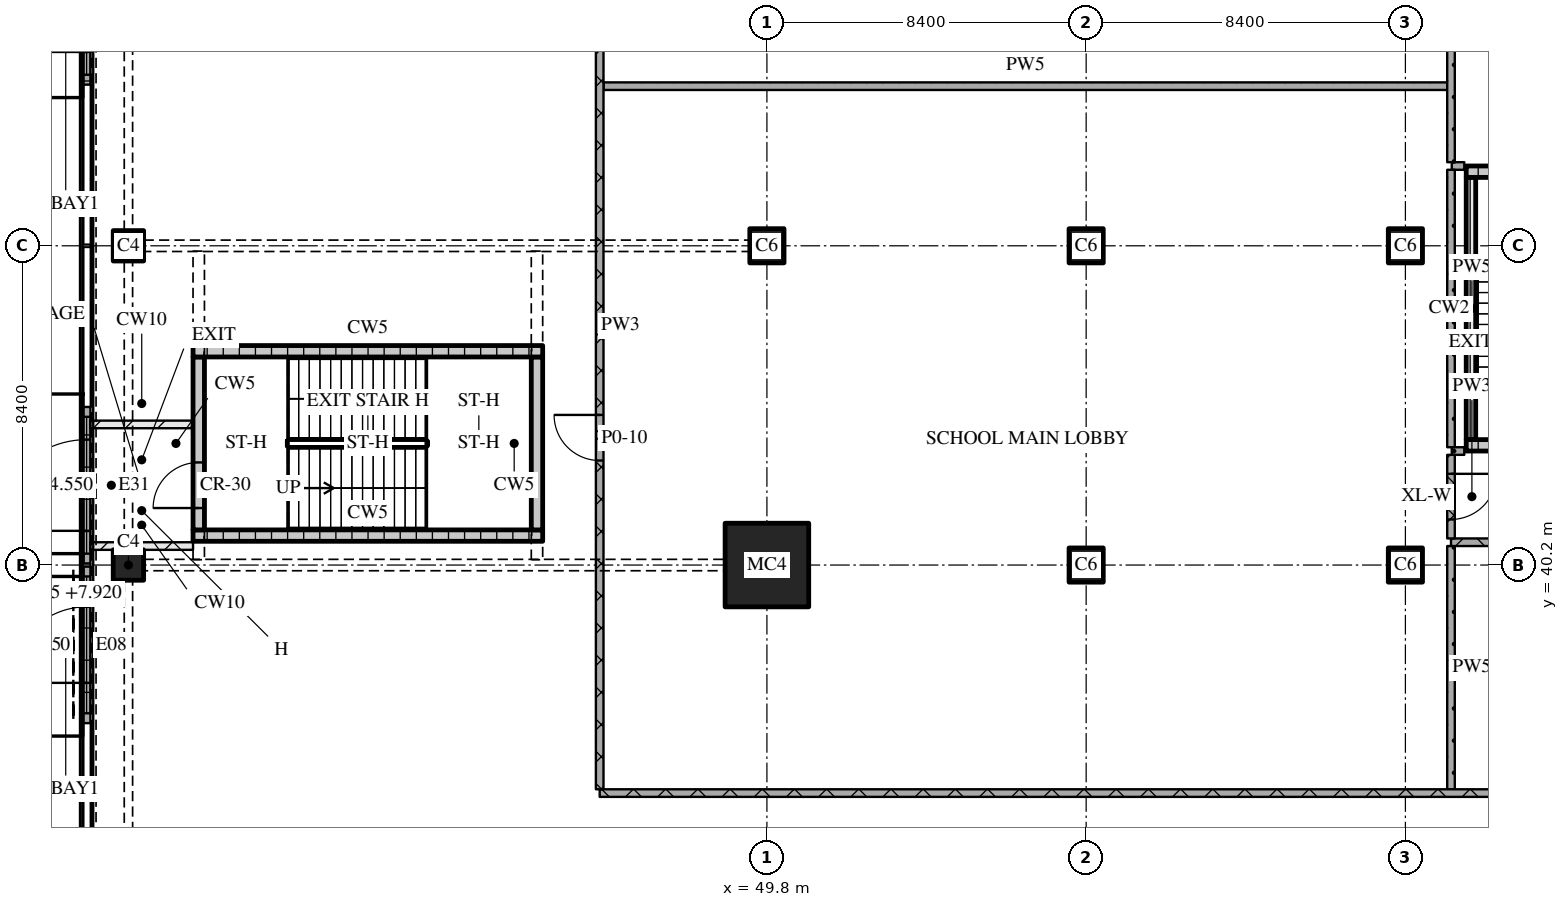
"""IFC4 building model, lengths in metres.
Left out: names, types, materials, properties, quantities, classifications, styles, units other than length and angle.
Written with IfcOpenShell. Run it as: python <this file> out.ifc"""

import sys

from ifc_helpers import new_model, si_unit, direction, frame, frame_2d, origin, origin_2d, place, context, subcontext, project, spatial, rectangle, extrude, element, fill, save


model = new_model("IFC4")
c1 = context("Model", 3, precision=1e-05, world=origin(), true_north=direction((0.0, 1.0)))
c2 = subcontext(c1, "Body", "Model", "MODEL_VIEW")
j1 = project(units=[si_unit("LENGTHUNIT", "METRE"), si_unit("PLANEANGLEUNIT", "RADIAN")], contexts=[c1])
p1 = place(None, origin())
s1 = spatial("IfcSite", under=j1, at=p1, CompositionType="ELEMENT")
p2 = place(p1, origin())
s2 = spatial("IfcBuilding", under=s1, at=p2, CompositionType="ELEMENT")
p3 = place(p2, origin())
s3 = spatial("IfcBuildingStorey", under=s2, at=p3, CompositionType="ELEMENT", Elevation=0.0)
p4 = place(p3, frame((49.8, 40.2, 0.0), z_axis=(0.0, 0.0, 1.0), x_axis=(1.0, 0.0, 0.0)))
e1 = element("IfcColumn", 1, at=p4, inside=s3, PredefinedType="COLUMN", context=c2, shape_type="SweptSolid", body=[
    extrude(rectangle(XDim=2.2, YDim=2.2, at=origin_2d()), origin(), (0.0, 0.0, 1.0), 9.0),
])
for number, where, z_axis, x_axis in (
    (2, (49.8, 48.6, 0.0), (0.0, 0.0, 1.0), (1.0, 0.0, 0.0)),
    (3, (58.2, 40.2, 0.0), (0.0, 0.0, 1.0), (1.0, 0.0, 0.0)),
    (4, (58.2, 48.6, 0.0), (0.0, 0.0, 1.0), (1.0, 0.0, 0.0)),
    (5, (66.6, 40.2, 0.0), (0.0, 0.0, 1.0), (1.0, 0.0, 0.0)),
    (6, (66.6, 48.6, 0.0), (0.0, 0.0, 1.0), (1.0, 0.0, 0.0)),
):
    element("IfcColumn", number, at=place(p3, frame(where, z_axis=z_axis, x_axis=x_axis)), inside=s3, PredefinedType="COLUMN", context=c2, shape_type="SweptSolid", body=[
        extrude(rectangle(XDim=0.9, YDim=0.9, at=origin_2d()), origin(), (0.0, 0.0, 1.0), 9.0),
    ])
for number, where, z_axis, x_axis in (
    (7, (33.0, 40.2, 0.0), (0.0, 0.0, 1.0), (1.0, 0.0, 0.0)),
    (8, (33.0, 48.6, 0.0), (0.0, 0.0, 1.0), (1.0, 0.0, 0.0)),
):
    element("IfcColumn", number, at=place(p3, frame(where, z_axis=z_axis, x_axis=x_axis)), inside=s3, PredefinedType="COLUMN", context=c2, shape_type="SweptSolid", body=[
        extrude(rectangle(XDim=0.8, YDim=0.8, at=origin_2d()), origin(), (0.0, 0.0, 1.0), 9.0),
    ])
p5 = place(p3, frame((31.9, 36.04, 0.0), z_axis=(0.0, 0.0, 1.0), x_axis=(0.0, 1.0, 0.0)))
e9 = element("IfcWall", 9, at=p5, inside=s3, PredefinedType="SOLIDWALL", context=c2, shape_type="SweptSolid", body=[
    extrude(rectangle(XDim=4.12, YDim=0.2, at=frame_2d((2.06, 0.0))), origin(), (0.0, 0.0, 1.0), 8.7),
])
p6 = place(p5, frame((1.06, 0.0, 0.0)))
e10 = element("IfcOpeningElement", 10, at=p6, cuts=e9, PredefinedType="OPENING", context=c2, shape_type="SweptSolid", body=[
    extrude(rectangle(XDim=2.0, YDim=2.4, at=frame_2d((1.0, 1.2))), frame((0.0, 0.11, 0.0), z_axis=(0.0, -1.0, 0.0), x_axis=(1.0, 0.0, 0.0)), (0.0, 0.0, 1.0), 0.22),
])
p7 = place(p5, frame((0.26, 0.0, 2.7)))
e11 = element("IfcOpeningElement", 11, at=p7, cuts=e9, PredefinedType="OPENING", context=c2, shape_type="SweptSolid", body=[
    extrude(rectangle(XDim=3.6, YDim=5.6, at=frame_2d((1.8, 2.8))), frame((0.0, 0.11, 0.0), z_axis=(0.0, -1.0, 0.0), x_axis=(1.0, 0.0, 0.0)), (0.0, 0.0, 1.0), 0.22),
])
p8 = place(p3, frame((31.9, 52.84, 0.0), z_axis=(0.0, 0.0, 1.0), x_axis=(0.0, 1.0, 0.0)))
e12 = element("IfcWall", 12, at=p8, inside=s3, PredefinedType="SOLIDWALL", context=c2, shape_type="SweptSolid", body=[
    extrude(rectangle(XDim=4.12, YDim=0.2, at=frame_2d((2.06, 0.0))), origin(), (0.0, 0.0, 1.0), 8.7),
])
p9 = place(p8, frame((0.86, 0.0, 0.0)))
e13 = element("IfcOpeningElement", 13, at=p9, cuts=e12, PredefinedType="OPENING", context=c2, shape_type="SweptSolid", body=[
    extrude(rectangle(XDim=2.4, YDim=2.4, at=frame_2d((1.2, 1.2))), frame((0.0, 0.11, 0.0), z_axis=(0.0, -1.0, 0.0), x_axis=(1.0, 0.0, 0.0)), (0.0, 0.0, 1.0), 0.22),
])
p10 = place(p8, frame((0.26, 0.0, 2.7)))
e14 = element("IfcOpeningElement", 14, at=p10, cuts=e12, PredefinedType="OPENING", context=c2, shape_type="SweptSolid", body=[
    extrude(rectangle(XDim=3.6, YDim=5.6, at=frame_2d((1.8, 2.8))), frame((0.0, 0.11, 0.0), z_axis=(0.0, -1.0, 0.0), x_axis=(1.0, 0.0, 0.0)), (0.0, 0.0, 1.0), 0.22),
])
p11 = place(p3, frame((31.9, 40.24, 0.0), z_axis=(0.0, 0.0, 1.0), x_axis=(0.0, 1.0, 0.0)))
e15 = element("IfcWall", 15, at=p11, inside=s3, PredefinedType="SOLIDWALL", context=c2, shape_type="SweptSolid", body=[
    extrude(rectangle(XDim=4.12, YDim=0.2, at=frame_2d((2.06, 0.0))), origin(), (0.0, 0.0, 1.0), 8.7),
])
p12 = place(p11, frame((0.86, 0.0, 0.0)))
e16 = element("IfcOpeningElement", 16, at=p12, cuts=e15, PredefinedType="OPENING", context=c2, shape_type="SweptSolid", body=[
    extrude(rectangle(XDim=2.4, YDim=2.4, at=frame_2d((1.2, 1.2))), frame((0.0, 0.11, 0.0), z_axis=(0.0, -1.0, 0.0), x_axis=(1.0, 0.0, 0.0)), (0.0, 0.0, 1.0), 0.22),
])
p13 = place(p11, frame((0.26, 0.0, 2.7)))
e17 = element("IfcOpeningElement", 17, at=p13, cuts=e15, PredefinedType="OPENING", context=c2, shape_type="SweptSolid", body=[
    extrude(rectangle(XDim=3.6, YDim=5.6, at=frame_2d((1.8, 2.8))), frame((0.0, 0.11, 0.0), z_axis=(0.0, -1.0, 0.0), x_axis=(1.0, 0.0, 0.0)), (0.0, 0.0, 1.0), 0.22),
])
p14 = place(p3, frame((68.2, 43.35, 0.0), z_axis=(0.0, 0.0, 1.0), x_axis=(1.0, 0.0, 0.0)))
e18 = element("IfcWall", 18, at=p14, inside=s3, PredefinedType="SOLIDWALL", context=c2, shape_type="SweptSolid", body=[
    extrude(rectangle(XDim=5.6, YDim=0.3, at=frame_2d((2.8, 0.0))), origin(), (0.0, 0.0, 1.0), 8.7),
])
p15 = place(p14, frame((3.875, 0.0, 0.0)))
e19 = element("IfcOpeningElement", 19, at=p15, cuts=e18, PredefinedType="OPENING", context=c2, shape_type="SweptSolid", body=[
    extrude(rectangle(XDim=1.0, YDim=2.1, at=frame_2d((0.5, 1.05))), frame((0.0, 0.16, 0.0), z_axis=(0.0, -1.0, 0.0), x_axis=(1.0, 0.0, 0.0)), (0.0, 0.0, 1.0), 0.32),
])
p16 = place(p3, frame((68.325, 43.5, 0.0), z_axis=(0.0, 0.0, 1.0), x_axis=(0.0, 1.0, 0.0)))
e20 = element("IfcWall", 20, at=p16, inside=s3, PredefinedType="SOLIDWALL", context=c2, shape_type="SweptSolid", body=[
    extrude(rectangle(XDim=6.9, YDim=0.25, at=frame_2d((3.45, 0.0))), origin(), (0.0, 0.0, 1.0), 8.7),
])
p17 = place(p3, frame((68.2, 50.55, 0.0), z_axis=(0.0, 0.0, 1.0), x_axis=(1.0, 0.0, 0.0)))
e21 = element("IfcWall", 21, at=p17, inside=s3, PredefinedType="SOLIDWALL", context=c2, shape_type="SweptSolid", body=[
    extrude(rectangle(XDim=5.6, YDim=0.3, at=frame_2d((2.8, 0.0))), origin(), (0.0, 0.0, 1.0), 8.7),
])
p18 = place(p3, frame((34.7, 40.975, 0.0), z_axis=(0.0, 0.0, 1.0), x_axis=(1.0, 0.0, 0.0)))
e22 = element("IfcWall", 22, at=p18, inside=s3, PredefinedType="SOLIDWALL", context=c2, shape_type="SweptSolid", body=[
    extrude(rectangle(XDim=9.2, YDim=0.3, at=frame_2d((4.6, 0.0))), origin(), (0.0, 0.0, 1.0), 8.7),
])
p19 = place(p3, frame((34.85, 41.125, 0.0), z_axis=(0.0, 0.0, 1.0), x_axis=(0.0, 1.0, 0.0)))
e23 = element("IfcWall", 23, at=p19, inside=s3, PredefinedType="SOLIDWALL", context=c2, shape_type="SweptSolid", body=[
    extrude(rectangle(XDim=4.55, YDim=0.3, at=frame_2d((2.275, 0.0))), origin(), (0.0, 0.0, 1.0), 8.7),
])
p20 = place(p19, frame((0.575, 0.0, 0.0)))
e24 = element("IfcOpeningElement", 24, at=p20, cuts=e23, PredefinedType="OPENING", context=c2, shape_type="SweptSolid", body=[
    extrude(rectangle(XDim=1.2, YDim=2.1, at=frame_2d((0.6, 1.05))), frame((0.0, 0.16, 0.0), z_axis=(0.0, -1.0, 0.0), x_axis=(1.0, 0.0, 0.0)), (0.0, 0.0, 1.0), 0.32),
])
p21 = place(p3, frame((43.75, 41.125, 0.0), z_axis=(0.0, 0.0, 1.0), x_axis=(0.0, 1.0, 0.0)))
e25 = element("IfcWall", 25, at=p21, inside=s3, PredefinedType="SOLIDWALL", context=c2, shape_type="SweptSolid", body=[
    extrude(rectangle(XDim=4.55, YDim=0.3, at=frame_2d((2.275, 0.0))), origin(), (0.0, 0.0, 1.0), 8.7),
])
p22 = place(p3, frame((34.7, 45.825, 0.0), z_axis=(0.0, 0.0, 1.0), x_axis=(1.0, 0.0, 0.0)))
e26 = element("IfcWall", 26, at=p22, inside=s3, PredefinedType="SOLIDWALL", context=c2, shape_type="SweptSolid", body=[
    extrude(rectangle(XDim=9.2, YDim=0.3, at=frame_2d((4.6, 0.0))), origin(), (0.0, 0.0, 1.0), 8.7),
])
for number, where, z_axis, x_axis in (
    (27, (32.0, 40.7, 0.0), (0.0, 0.0, 1.0), (1.0, 0.0, 0.0)),
    (28, (32.0, 43.9, 0.0), (0.0, 0.0, 1.0), (1.0, 0.0, 0.0)),
):
    element("IfcWall", number, at=place(p3, frame(where, z_axis=z_axis, x_axis=x_axis)), inside=s3, PredefinedType="PARTITIONING", context=c2, shape_type="SweptSolid", body=[
        extrude(rectangle(XDim=2.7, YDim=0.2, at=frame_2d((1.35, 0.0))), origin(), (0.0, 0.0, 1.0), 8.7),
    ])
p23 = place(p3, frame((45.4, 34.2, 0.0), z_axis=(0.0, 0.0, 1.0), x_axis=(1.0, 0.0, 0.0)))
e29 = element("IfcWall", 29, at=p23, inside=s3, PredefinedType="PARTITIONING", context=c2, shape_type="SweptSolid", body=[
    extrude(rectangle(XDim=84.4, YDim=0.2, at=frame_2d((42.2, 0.0))), origin(), (0.0, 0.0, 1.0), 8.7),
])
p24 = place(p23, frame((27.5, 0.0, 0.0)))
e30 = element("IfcOpeningElement", 30, at=p24, cuts=e29, PredefinedType="OPENING", context=c2, shape_type="SweptSolid", body=[
    extrude(rectangle(XDim=1.2, YDim=2.1, at=frame_2d((0.6, 1.05))), frame((0.0, 0.11, 0.0), z_axis=(0.0, -1.0, 0.0), x_axis=(1.0, 0.0, 0.0)), (0.0, 0.0, 1.0), 0.22),
])
p25 = place(p23, frame((41.5, 0.0, 0.0)))
e31 = element("IfcOpeningElement", 31, at=p25, cuts=e29, PredefinedType="OPENING", context=c2, shape_type="SweptSolid", body=[
    extrude(rectangle(XDim=1.2, YDim=2.1, at=frame_2d((0.6, 1.05))), frame((0.0, 0.11, 0.0), z_axis=(0.0, -1.0, 0.0), x_axis=(1.0, 0.0, 0.0)), (0.0, 0.0, 1.0), 0.22),
])
p26 = place(p23, frame((55.6, 0.0, 0.0)))
e32 = element("IfcOpeningElement", 32, at=p26, cuts=e29, PredefinedType="OPENING", context=c2, shape_type="SweptSolid", body=[
    extrude(rectangle(XDim=1.2, YDim=2.1, at=frame_2d((0.6, 1.05))), frame((0.0, 0.11, 0.0), z_axis=(0.0, -1.0, 0.0), x_axis=(1.0, 0.0, 0.0)), (0.0, 0.0, 1.0), 0.22),
])
p27 = place(p23, frame((72.75, 0.0, 0.0)))
e33 = element("IfcOpeningElement", 33, at=p27, cuts=e29, PredefinedType="OPENING", context=c2, shape_type="SweptSolid", body=[
    extrude(rectangle(XDim=1.2, YDim=2.1, at=frame_2d((0.6, 1.05))), frame((0.0, 0.11, 0.0), z_axis=(0.0, -1.0, 0.0), x_axis=(1.0, 0.0, 0.0)), (0.0, 0.0, 1.0), 0.22),
])
p28 = place(p3, frame((67.8, 40.8, 0.0), z_axis=(0.0, 0.0, 1.0), x_axis=(1.0, 0.0, 0.0)))
e34 = element("IfcWall", 34, at=p28, inside=s3, PredefinedType="PARTITIONING", context=c2, shape_type="SweptSolid", body=[
    extrude(rectangle(XDim=7.2, YDim=0.2, at=frame_2d((3.6, 0.0))), origin(), (0.0, 0.0, 1.0), 8.7),
])
for number, where, z_axis, x_axis in (
    (35, (67.82, 43.2, 0.0), (0.0, 0.0, 1.0), (1.0, 0.0, 0.0)),
    (36, (67.82, 50.7, 0.0), (0.0, 0.0, 1.0), (1.0, 0.0, 0.0)),
):
    element("IfcWall", number, at=place(p3, frame(where, z_axis=z_axis, x_axis=x_axis)), inside=s3, PredefinedType="PARTITIONING", context=c2, shape_type="SweptSolid", body=[
        extrude(rectangle(XDim=0.33, YDim=0.2, at=frame_2d((0.165, 0.0))), origin(), (0.0, 0.0, 1.0), 8.7),
    ])
p29 = place(p3, frame((45.5, 52.8, 0.0), z_axis=(0.0, 0.0, 1.0), x_axis=(1.0, 0.0, 0.0)))
e37 = element("IfcWall", 37, at=p29, inside=s3, PredefinedType="PARTITIONING", context=c2, shape_type="SweptSolid", body=[
    extrude(rectangle(XDim=22.2, YDim=0.2, at=frame_2d((11.1, 0.0))), origin(), (0.0, 0.0, 1.0), 8.7),
])
p30 = place(p3, frame((45.4, 58.7, 0.0), z_axis=(0.0, 0.0, 1.0), x_axis=(0.0, -1.0, 0.0)))
e38 = element("IfcWall", 38, at=p30, inside=s3, PredefinedType="PARTITIONING", context=c2, shape_type="SweptSolid", body=[
    extrude(rectangle(XDim=24.4, YDim=0.2, at=frame_2d((12.2, 0.0))), origin(), (0.0, 0.0, 1.0), 8.7),
])
p31 = place(p30, frame((14.55, 0.0, 0.0)))
e39 = element("IfcOpeningElement", 39, at=p31, cuts=e38, PredefinedType="OPENING", context=c2, shape_type="SweptSolid", body=[
    extrude(rectangle(XDim=1.2, YDim=2.1, at=frame_2d((0.6, 1.05))), frame((0.0, 0.11, 0.0), z_axis=(0.0, -1.0, 0.0), x_axis=(1.0, 0.0, 0.0)), (0.0, 0.0, 1.0), 0.22),
])
p32 = place(p3, frame((67.8, 43.1, 0.0), z_axis=(0.0, 0.0, 1.0), x_axis=(0.0, -1.0, 0.0)))
e40 = element("IfcWall", 40, at=p32, inside=s3, PredefinedType="PARTITIONING", context=c2, shape_type="SweptSolid", body=[
    extrude(rectangle(XDim=2.2, YDim=0.2, at=frame_2d((1.1, 0.0))), origin(), (0.0, 0.0, 1.0), 8.7),
])
p33 = place(p32, frame((0.5, 0.0, 0.0)))
e41 = element("IfcOpeningElement", 41, at=p33, cuts=e40, PredefinedType="OPENING", context=c2, shape_type="SweptSolid", body=[
    extrude(rectangle(XDim=1.2, YDim=2.1, at=frame_2d((0.6, 1.05))), frame((0.0, 0.11, 0.0), z_axis=(0.0, -1.0, 0.0), x_axis=(1.0, 0.0, 0.0)), (0.0, 0.0, 1.0), 0.22),
])
p34 = place(p3, frame((67.8, 50.6, 0.0), z_axis=(0.0, 0.0, 1.0), x_axis=(0.0, -1.0, 0.0)))
e42 = element("IfcWall", 42, at=p34, inside=s3, PredefinedType="PARTITIONING", context=c2, shape_type="SweptSolid", body=[
    extrude(rectangle(XDim=7.3, YDim=0.2, at=frame_2d((3.65, 0.0))), origin(), (0.0, 0.0, 1.0), 8.7),
])
p35 = place(p3, frame((67.8, 40.7, 0.0), z_axis=(0.0, 0.0, 1.0), x_axis=(0.0, -1.0, 0.0)))
e43 = element("IfcWall", 43, at=p35, inside=s3, PredefinedType="PARTITIONING", context=c2, shape_type="SweptSolid", body=[
    extrude(rectangle(XDim=6.4, YDim=0.2, at=frame_2d((3.2, 0.0))), origin(), (0.0, 0.0, 1.0), 8.7),
])
p36 = place(p3, frame((67.8, 58.7, 0.0), z_axis=(0.0, 0.0, 1.0), x_axis=(0.0, -1.0, 0.0)))
e44 = element("IfcWall", 44, at=p36, inside=s3, PredefinedType="PARTITIONING", context=c2, shape_type="SweptSolid", body=[
    extrude(rectangle(XDim=7.9, YDim=0.2, at=frame_2d((3.95, 0.0))), origin(), (0.0, 0.0, 1.0), 8.7),
])
p37 = place(p6, origin())
e45 = element("IfcDoor", 45, at=p37, inside=s3, OperationType="DOUBLE_DOOR_SINGLE_SWING", PredefinedType="GATE", context=c2, shape_type="SweptSolid", body=[
    extrude(rectangle(XDim=2.0, YDim=2.4, at=frame_2d((1.0, 1.2))), frame((0.0, 0.025, 0.0), z_axis=(0.0, -1.0, 0.0), x_axis=(1.0, 0.0, 0.0)), (0.0, 0.0, 1.0), 0.05),
])
fill(e10, e45)
p38 = place(p7, origin())
e46 = element("IfcWindow", 46, at=p38, inside=s3, PartitioningType="SINGLE_PANEL", PredefinedType="WINDOW", context=c2, shape_type="SweptSolid", body=[
    extrude(rectangle(XDim=3.6, YDim=5.6, at=frame_2d((1.8, 2.8))), frame((0.0, 0.03, 0.0), z_axis=(0.0, -1.0, 0.0), x_axis=(1.0, 0.0, 0.0)), (0.0, 0.0, 1.0), 0.06),
])
fill(e11, e46)
p39 = place(p10, origin())
e47 = element("IfcWindow", 47, at=p39, inside=s3, PartitioningType="SINGLE_PANEL", PredefinedType="WINDOW", context=c2, shape_type="SweptSolid", body=[
    extrude(rectangle(XDim=3.6, YDim=5.6, at=frame_2d((1.8, 2.8))), frame((0.0, 0.03, 0.0), z_axis=(0.0, -1.0, 0.0), x_axis=(1.0, 0.0, 0.0)), (0.0, 0.0, 1.0), 0.06),
])
fill(e14, e47)
p40 = place(p12, origin())
e48 = element("IfcDoor", 48, at=p40, inside=s3, OperationType="DOUBLE_DOOR_SINGLE_SWING", PredefinedType="DOOR", context=c2, shape_type="SweptSolid", body=[
    extrude(rectangle(XDim=2.4, YDim=2.4, at=frame_2d((1.2, 1.2))), frame((0.0, 0.025, 0.0), z_axis=(0.0, -1.0, 0.0), x_axis=(1.0, 0.0, 0.0)), (0.0, 0.0, 1.0), 0.05),
])
fill(e16, e48)
p41 = place(p13, origin())
e49 = element("IfcWindow", 49, at=p41, inside=s3, PartitioningType="SINGLE_PANEL", PredefinedType="WINDOW", context=c2, shape_type="SweptSolid", body=[
    extrude(rectangle(XDim=3.6, YDim=5.6, at=frame_2d((1.8, 2.8))), frame((0.0, 0.03, 0.0), z_axis=(0.0, -1.0, 0.0), x_axis=(1.0, 0.0, 0.0)), (0.0, 0.0, 1.0), 0.06),
])
fill(e17, e49)
p42 = place(p20, origin())
e50 = element("IfcDoor", 50, at=p42, inside=s3, OperationType="SINGLE_SWING_LEFT", PredefinedType="DOOR", context=c2, shape_type="SweptSolid", body=[
    extrude(rectangle(XDim=1.2, YDim=2.1, at=frame_2d((0.6, 1.05))), frame((0.0, 0.025, 0.0), z_axis=(0.0, -1.0, 0.0), x_axis=(1.0, 0.0, 0.0)), (0.0, 0.0, 1.0), 0.05),
])
fill(e24, e50)
p43 = place(p31, origin())
e51 = element("IfcDoor", 51, at=p43, inside=s3, OperationType="SINGLE_SWING_RIGHT", PredefinedType="DOOR", context=c2, shape_type="SweptSolid", body=[
    extrude(rectangle(XDim=1.2, YDim=2.1, at=frame_2d((0.6, 1.05))), frame((0.0, 0.025, 0.0), z_axis=(0.0, -1.0, 0.0), x_axis=(1.0, 0.0, 0.0)), (0.0, 0.0, 1.0), 0.05),
])
fill(e39, e51)
p44 = place(p33, origin())
e52 = element("IfcDoor", 52, at=p44, inside=s3, OperationType="SINGLE_SWING_LEFT", PredefinedType="DOOR", context=c2, shape_type="SweptSolid", body=[
    extrude(rectangle(XDim=1.2, YDim=2.1, at=frame_2d((0.6, 1.05))), frame((0.0, 0.025, 0.0), z_axis=(0.0, -1.0, 0.0), x_axis=(1.0, 0.0, 0.0)), (0.0, 0.0, 1.0), 0.05),
])
fill(e41, e52)
save(model, sys.argv[1])
